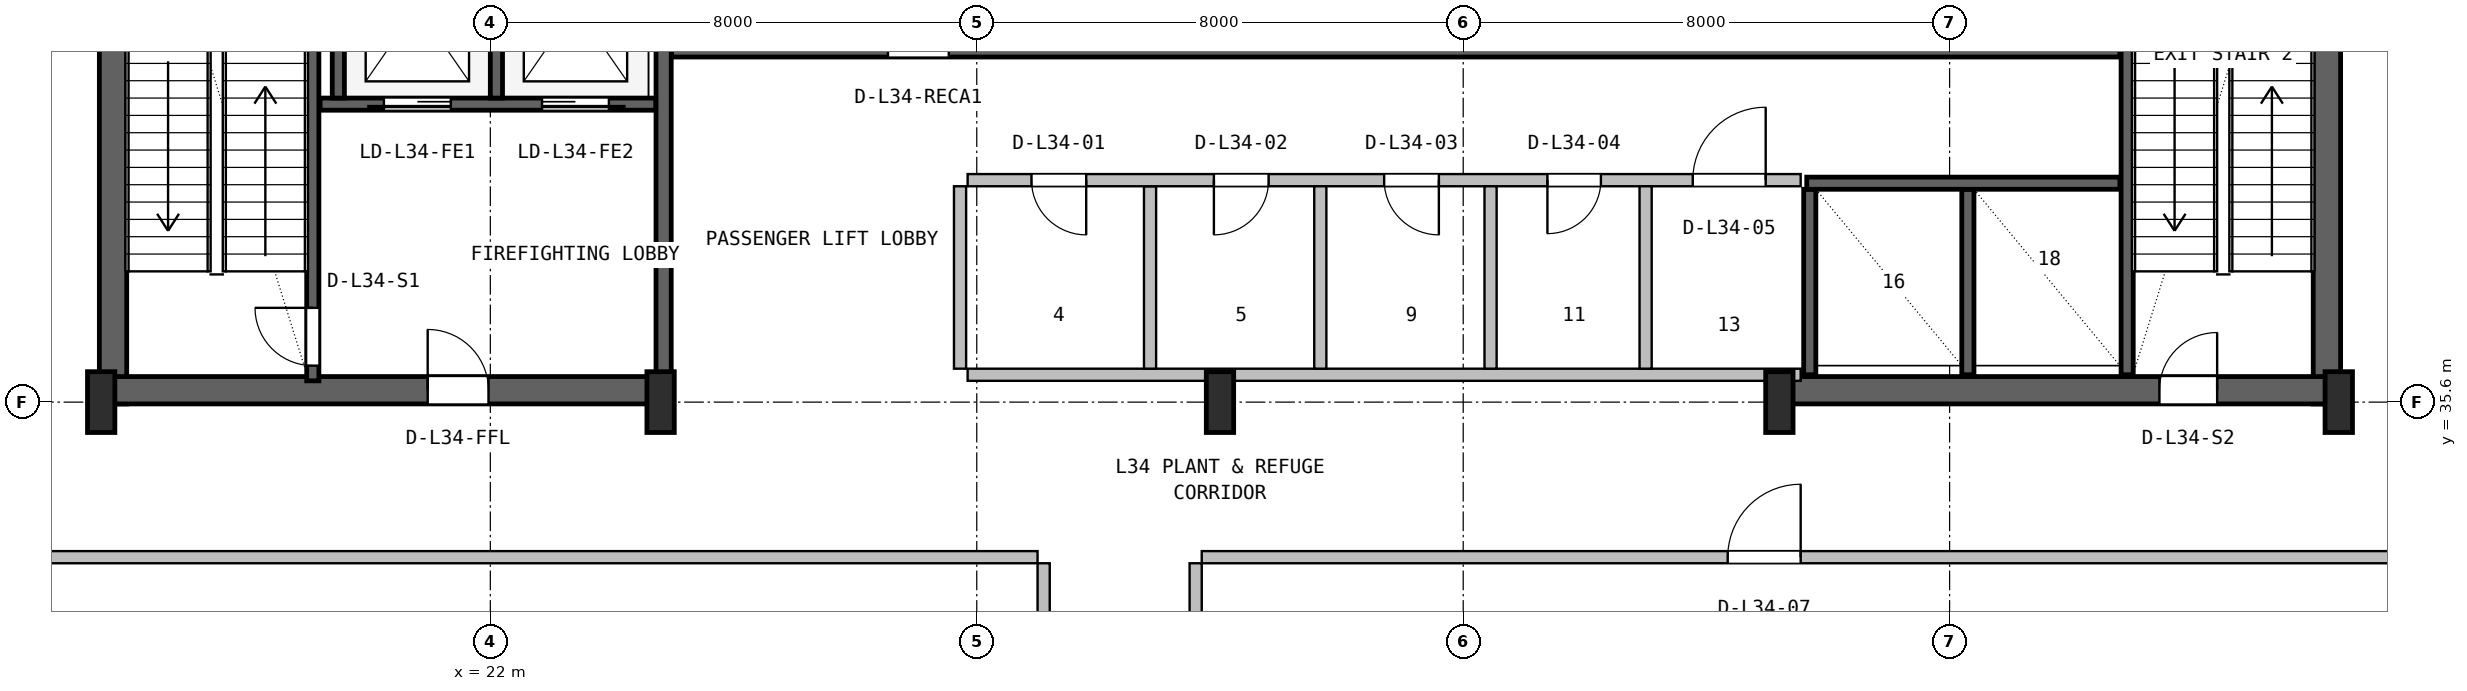
"""IFC4 building model, lengths in metres.
Left out: names, types, materials, properties, quantities, classifications, styles, units other than length and angle.
Written with IfcOpenShell. Run it as: python <this file> out.ifc"""

import sys

from ifc_helpers import new_model, si_unit, direction, frame, frame_2d, origin, origin_2d, place, context, subcontext, project, spatial, rectangle, i_section, extrude, source, transform, mapped, element, fill, save


model = new_model("IFC4")
c1 = context("Model", 3, precision=1e-05, world=origin(), true_north=direction((0.0, 1.0)))
c2 = subcontext(c1, "Body", "Model", "MODEL_VIEW")
j1 = project(units=[si_unit("LENGTHUNIT", "METRE"), si_unit("PLANEANGLEUNIT", "RADIAN")], contexts=[c1])
p1 = place(None, origin())
s1 = spatial("IfcSite", under=j1, at=p1, CompositionType="ELEMENT")
p2 = place(p1, origin())
s2 = spatial("IfcBuilding", under=s1, at=p2, CompositionType="ELEMENT")
p3 = place(p2, frame((0.0, 0.0, 141.0)))
s3 = spatial("IfcBuildingStorey", under=s2, at=p3, CompositionType="ELEMENT", Elevation=141.0)
for number, where, z_axis, x_axis in (
    (1, (15.795, 35.57, 0.0), (0.0, 0.0, 1.0), (0.0, 1.0, 0.0)),
    (2, (52.205, 35.57, 0.0), (0.0, 0.0, 1.0), (0.0, 1.0, 0.0)),
):
    element("IfcWall", number, at=place(p3, frame(where, z_axis=z_axis, x_axis=x_axis)), inside=s3, PredefinedType="SHEAR", context=c2, shape_type="SweptSolid", body=[
        extrude(rectangle(XDim=11.23, YDim=0.45, at=frame_2d((5.615, 0.0))), origin(), (0.0, 0.0, 1.0), 4.55),
    ])
p4 = place(p3, frame((15.57, 35.795, 0.0), z_axis=(0.0, 0.0, 1.0), x_axis=(1.0, 0.0, 0.0)))
e3 = element("IfcWall", 3, at=p4, inside=s3, PredefinedType="SHEAR", context=c2, shape_type="SweptSolid", body=[
    extrude(rectangle(XDim=9.23, YDim=0.45, at=frame_2d((4.615, 0.0))), origin(), (0.0, 0.0, 1.0), 4.55),
])
p5 = place(p4, frame((5.4, 0.0, 0.0)))
e4 = element("IfcOpeningElement", 4, at=p5, cuts=e3, PredefinedType="OPENING", context=c2, shape_type="SweptSolid", body=[
    extrude(rectangle(XDim=1.0, YDim=2.1, at=frame_2d((0.5, 1.05))), frame((0.0, 0.235, 0.0), z_axis=(0.0, -1.0, 0.0), x_axis=(1.0, 0.0, 0.0)), (0.0, 0.0, 1.0), 0.47),
])
p6 = place(p3, frame((43.2, 35.795, 0.0), z_axis=(0.0, 0.0, 1.0), x_axis=(1.0, 0.0, 0.0)))
e5 = element("IfcWall", 5, at=p6, inside=s3, PredefinedType="SHEAR", context=c2, shape_type="SweptSolid", body=[
    extrude(rectangle(XDim=9.23, YDim=0.45, at=frame_2d((4.615, 0.0))), origin(), (0.0, 0.0, 1.0), 4.55),
])
p7 = place(p6, frame((6.25, 0.0, 0.0)))
e6 = element("IfcOpeningElement", 6, at=p7, cuts=e5, PredefinedType="OPENING", context=c2, shape_type="SweptSolid", body=[
    extrude(rectangle(XDim=0.95, YDim=2.1, at=frame_2d((0.475, 1.05))), frame((0.0, 0.235, 0.0), z_axis=(0.0, -1.0, 0.0), x_axis=(1.0, 0.0, 0.0)), (0.0, 0.0, 1.0), 0.47),
])
m1 = source(origin(), c2, "Body", "SweptSolid", [
    extrude(i_section(OverallWidth=0.45, OverallDepth=1.0, WebThickness=0.016, FlangeThickness=0.03, FilletRadius=0.016, at=origin_2d()), origin(), (0.0, 0.0, 1.0), 4.8),
])
for number, where, z_axis, x_axis in (
    (7, (15.6, 35.6, 0.0), (0.0, 0.0, 1.0), (1.0, 0.0, 0.0)),
    (8, (24.8, 35.6, 0.0), (0.0, 0.0, 1.0), (1.0, 0.0, 0.0)),
    (9, (34.0, 35.6, 0.0), (0.0, 0.0, 1.0), (1.0, 0.0, 0.0)),
    (10, (43.2, 35.6, 0.0), (0.0, 0.0, 1.0), (1.0, 0.0, 0.0)),
    (11, (52.4, 35.6, 0.0), (0.0, 0.0, 1.0), (1.0, 0.0, 0.0)),
):
    element("IfcColumn", number, at=place(p3, frame(where, z_axis=z_axis, x_axis=x_axis)), inside=s3, PredefinedType="COLUMN", context=c2, shape_type="MappedRepresentation", body=[
        mapped(m1, transform((0.0, 0.0, 0.0), x_axis=(1.0, 0.0, 0.0), y_axis=(0.0, 1.0, 0.0), z_axis=(0.0, 0.0, 1.0), scale=1.0)),
    ])
p8 = place(p3, frame((19.08, 35.95, 0.0), z_axis=(0.0, 0.0, 1.0), x_axis=(0.0, 1.0, 0.0)))
e12 = element("IfcWall", 12, at=p8, inside=s3, PredefinedType="SHEAR", context=c2, shape_type="SweptSolid", body=[
    extrude(rectangle(XDim=9.65, YDim=0.2, at=frame_2d((4.825, 0.0))), origin(), (0.0, 0.0, 1.0), 4.55),
])
p9 = place(p8, frame((0.25, 0.0, 0.0)))
e13 = element("IfcOpeningElement", 13, at=p9, cuts=e12, PredefinedType="OPENING", context=c2, shape_type="SweptSolid", body=[
    extrude(rectangle(XDim=0.95, YDim=2.1, at=frame_2d((0.475, 1.05))), frame((0.0, 0.11, 0.0), z_axis=(0.0, -1.0, 0.0), x_axis=(1.0, 0.0, 0.0)), (0.0, 0.0, 1.0), 0.22),
])
p10 = place(p3, frame((24.85, 36.05, 0.0), z_axis=(0.0, 0.0, 1.0), x_axis=(0.0, 1.0, 0.0)))
e14 = element("IfcWall", 14, at=p10, inside=s3, PredefinedType="SHEAR", context=c2, shape_type="SweptSolid", body=[
    extrude(rectangle(XDim=10.45, YDim=0.25, at=frame_2d((5.225, 0.0))), origin(), (0.0, 0.0, 1.0), 4.55),
])
p11 = place(p3, frame((19.2, 40.5, 0.0), z_axis=(0.0, 0.0, 1.0), x_axis=(1.0, 0.0, 0.0)))
e15 = element("IfcWall", 15, at=p11, inside=s3, PredefinedType="SHEAR", context=c2, shape_type="SweptSolid", body=[
    extrude(rectangle(XDim=5.52, YDim=0.2, at=frame_2d((2.76, 0.0))), origin(), (0.0, 0.0, 1.0), 4.55),
])
p12 = place(p11, frame((1.05, 0.0, 0.0)))
e16 = element("IfcOpeningElement", 16, at=p12, cuts=e15, PredefinedType="OPENING", context=c2, shape_type="SweptSolid", body=[
    extrude(rectangle(XDim=1.1, YDim=2.18, at=frame_2d((0.55, 1.09))), frame((0.0, 0.11, 0.0), z_axis=(0.0, -1.0, 0.0), x_axis=(1.0, 0.0, 0.0)), (0.0, 0.0, 1.0), 0.22),
])
p13 = place(p11, frame((3.65, 0.0, 0.0)))
e17 = element("IfcOpeningElement", 17, at=p13, cuts=e15, PredefinedType="OPENING", context=c2, shape_type="SweptSolid", body=[
    extrude(rectangle(XDim=1.1, YDim=2.18, at=frame_2d((0.55, 1.09))), frame((0.0, 0.11, 0.0), z_axis=(0.0, -1.0, 0.0), x_axis=(1.0, 0.0, 0.0)), (0.0, 0.0, 1.0), 0.22),
])
p14 = place(p3, frame((22.1, 40.6, 0.0), z_axis=(0.0, 0.0, 1.0), x_axis=(0.0, 1.0, 0.0)))
e18 = element("IfcWall", 18, at=p14, inside=s3, PredefinedType="SHEAR", context=c2, shape_type="SweptSolid", body=[
    extrude(rectangle(XDim=3.0, YDim=0.2, at=frame_2d((1.5, 0.0))), origin(), (0.0, 0.0, 1.0), 4.55),
])
p15 = place(p3, frame((19.5, 40.6, 0.0), z_axis=(0.0, 0.0, 1.0), x_axis=(0.0, 1.0, 0.0)))
e19 = element("IfcWall", 19, at=p15, inside=s3, PredefinedType="SHEAR", context=c2, shape_type="SweptSolid", body=[
    extrude(rectangle(XDim=5.95, YDim=0.2, at=frame_2d((2.975, 0.0))), origin(), (0.0, 0.0, 1.0), 4.55),
])
p16 = place(p3, frame((48.92, 36.05, 0.0), z_axis=(0.0, 0.0, 1.0), x_axis=(0.0, 1.0, 0.0)))
e20 = element("IfcWall", 20, at=p16, inside=s3, PredefinedType="SHEAR", context=c2, shape_type="SweptSolid", body=[
    extrude(rectangle(XDim=10.5, YDim=0.2, at=frame_2d((5.25, 0.0))), origin(), (0.0, 0.0, 1.0), 4.55),
])
p17 = place(p3, frame((24.98, 41.4, 0.0), z_axis=(0.0, 0.0, 1.0), x_axis=(1.0, 0.0, 0.0)))
e21 = element("IfcWall", 21, at=p17, inside=s3, PredefinedType="SHEAR", context=c2, shape_type="SweptSolid", body=[
    extrude(rectangle(XDim=23.82, YDim=0.25, at=frame_2d((11.91, 0.0))), origin(), (0.0, 0.0, 1.0), 4.55),
])
p18 = place(p17, frame((3.56, 0.0, 0.0)))
e22 = element("IfcOpeningElement", 22, at=p18, cuts=e21, PredefinedType="OPENING", context=c2, shape_type="SweptSolid", body=[
    extrude(rectangle(XDim=1.0, YDim=2.08, at=frame_2d((0.5, 1.04))), frame((0.0, 0.135, 0.0), z_axis=(0.0, -1.0, 0.0), x_axis=(1.0, 0.0, 0.0)), (0.0, 0.0, 1.0), 0.27),
])
for number, where, z_axis, x_axis in (
    (23, (43.7, 36.05, 0.0), (0.0, 0.0, 1.0), (0.0, 1.0, 0.0)),
    (24, (46.3, 36.05, 0.0), (0.0, 0.0, 1.0), (0.0, 1.0, 0.0)),
):
    element("IfcWall", number, at=place(p3, frame(where, z_axis=z_axis, x_axis=x_axis)), inside=s3, PredefinedType="SHEAR", context=c2, shape_type="SweptSolid", body=[
        extrude(rectangle(XDim=3.05, YDim=0.2, at=frame_2d((1.525, 0.0))), origin(), (0.0, 0.0, 1.0), 4.55),
    ])
p19 = place(p3, frame((43.65, 39.2, 0.0), z_axis=(0.0, 0.0, 1.0), x_axis=(1.0, 0.0, 0.0)))
e25 = element("IfcWall", 25, at=p19, inside=s3, PredefinedType="SHEAR", context=c2, shape_type="SweptSolid", body=[
    extrude(rectangle(XDim=5.15, YDim=0.2, at=frame_2d((2.575, 0.0))), origin(), (0.0, 0.0, 1.0), 4.55),
])
p20 = place(p3, frame((29.85, 36.05, 0.0), z_axis=(0.0, 0.0, 1.0), x_axis=(1.0, 0.0, 0.0)))
e26 = element("IfcWall", 26, at=p20, inside=s3, PredefinedType="SOLIDWALL", context=c2, shape_type="SweptSolid", body=[
    extrude(rectangle(XDim=13.7, YDim=0.2, at=frame_2d((6.85, 0.0))), origin(), (0.0, 0.0, 1.0), 4.53),
])
p21 = place(p3, frame((32.85, 36.15, 0.0), z_axis=(0.0, 0.0, 1.0), x_axis=(0.0, 1.0, 0.0)))
e27 = element("IfcWall", 27, at=p21, inside=s3, PredefinedType="SOLIDWALL", context=c2, shape_type="SweptSolid", body=[
    extrude(rectangle(XDim=3.0, YDim=0.2, at=frame_2d((1.5, 0.0))), origin(), (0.0, 0.0, 1.0), 4.53),
])
p22 = place(p3, frame((29.85, 39.25, 0.0), z_axis=(0.0, 0.0, 1.0), x_axis=(1.0, 0.0, 0.0)))
e28 = element("IfcWall", 28, at=p22, inside=s3, PredefinedType="SOLIDWALL", context=c2, shape_type="SweptSolid", body=[
    extrude(rectangle(XDim=13.7, YDim=0.2, at=frame_2d((6.85, 0.0))), origin(), (0.0, 0.0, 1.0), 4.53),
])
p23 = place(p22, frame((1.05, 0.0, 0.0)))
e29 = element("IfcOpeningElement", 29, at=p23, cuts=e28, PredefinedType="OPENING", context=c2, shape_type="SweptSolid", body=[
    extrude(rectangle(XDim=0.9, YDim=2.06, at=frame_2d((0.45, 1.03))), frame((0.0, 0.11, 0.0), z_axis=(0.0, -1.0, 0.0), x_axis=(1.0, 0.0, 0.0)), (0.0, 0.0, 1.0), 0.22),
])
p24 = place(p22, frame((4.05, 0.0, 0.0)))
e30 = element("IfcOpeningElement", 30, at=p24, cuts=e28, PredefinedType="OPENING", context=c2, shape_type="SweptSolid", body=[
    extrude(rectangle(XDim=0.9, YDim=2.06, at=frame_2d((0.45, 1.03))), frame((0.0, 0.11, 0.0), z_axis=(0.0, -1.0, 0.0), x_axis=(1.0, 0.0, 0.0)), (0.0, 0.0, 1.0), 0.22),
])
p25 = place(p22, frame((6.85, 0.0, 0.0)))
e31 = element("IfcOpeningElement", 31, at=p25, cuts=e28, PredefinedType="OPENING", context=c2, shape_type="SweptSolid", body=[
    extrude(rectangle(XDim=0.9, YDim=2.06, at=frame_2d((0.45, 1.03))), frame((0.0, 0.11, 0.0), z_axis=(0.0, -1.0, 0.0), x_axis=(1.0, 0.0, 0.0)), (0.0, 0.0, 1.0), 0.22),
])
p26 = place(p22, frame((9.535, 0.0, 0.0)))
e32 = element("IfcOpeningElement", 32, at=p26, cuts=e28, PredefinedType="OPENING", context=c2, shape_type="SweptSolid", body=[
    extrude(rectangle(XDim=0.88, YDim=2.06, at=frame_2d((0.44, 1.03))), frame((0.0, 0.11, 0.0), z_axis=(0.0, -1.0, 0.0), x_axis=(1.0, 0.0, 0.0)), (0.0, 0.0, 1.0), 0.22),
])
p27 = place(p22, frame((11.925, 0.0, 0.0)))
e33 = element("IfcOpeningElement", 33, at=p27, cuts=e28, PredefinedType="OPENING", context=c2, shape_type="SweptSolid", body=[
    extrude(rectangle(XDim=1.2, YDim=2.1, at=frame_2d((0.6, 1.05))), frame((0.0, 0.11, 0.0), z_axis=(0.0, -1.0, 0.0), x_axis=(1.0, 0.0, 0.0)), (0.0, 0.0, 1.0), 0.22),
])
for number, where, z_axis, x_axis in (
    (34, (29.725, 36.15, 0.0), (0.0, 0.0, 1.0), (0.0, 1.0, 0.0)),
    (35, (35.65, 36.15, 0.0), (0.0, 0.0, 1.0), (0.0, 1.0, 0.0)),
    (36, (38.45, 36.15, 0.0), (0.0, 0.0, 1.0), (0.0, 1.0, 0.0)),
    (37, (41.0, 36.15, 0.0), (0.0, 0.0, 1.0), (0.0, 1.0, 0.0)),
):
    element("IfcWall", number, at=place(p3, frame(where, z_axis=z_axis, x_axis=x_axis)), inside=s3, PredefinedType="SOLIDWALL", context=c2, shape_type="SweptSolid", body=[
        extrude(rectangle(XDim=3.0, YDim=0.2, at=frame_2d((1.5, 0.0))), origin(), (0.0, 0.0, 1.0), 4.53),
    ])
p28 = place(p3, frame((31.1, 19.775, 0.0), z_axis=(0.0, 0.0, 1.0), x_axis=(0.0, 1.0, 0.0)))
e38 = element("IfcWall", 38, at=p28, inside=s3, PredefinedType="SOLIDWALL", context=c2, shape_type="SweptSolid", body=[
    extrude(rectangle(XDim=13.175, YDim=0.2, at=frame_2d((6.587, 0.0))), origin(), (0.0, 0.0, 1.0), 2.925),
])
p29 = place(p3, frame((4.68, 33.05, 0.0), z_axis=(0.0, 0.0, 1.0), x_axis=(1.0, 0.0, 0.0)))
e39 = element("IfcWall", 39, at=p29, inside=s3, PredefinedType="SOLIDWALL", context=c2, shape_type="SweptSolid", body=[
    extrude(rectangle(XDim=26.32, YDim=0.2, at=frame_2d((13.16, 0.0))), origin(), (0.0, 0.0, 1.0), 2.925),
])
p30 = place(p3, frame((33.7, 33.05, 0.0), z_axis=(0.0, 0.0, 1.0), x_axis=(1.0, 0.0, 0.0)))
e40 = element("IfcWall", 40, at=p30, inside=s3, PredefinedType="SOLIDWALL", context=c2, shape_type="SweptSolid", body=[
    extrude(rectangle(XDim=29.62, YDim=0.2, at=frame_2d((14.81, 0.0))), origin(), (0.0, 0.0, 1.0), 2.925),
])
p31 = place(p30, frame((8.65, 0.0, 0.0)))
e41 = element("IfcOpeningElement", 41, at=p31, cuts=e40, PredefinedType="OPENING", context=c2, shape_type="SweptSolid", body=[
    extrude(rectangle(XDim=1.2, YDim=2.1, at=frame_2d((0.6, 1.05))), frame((0.0, 0.11, 0.0), z_axis=(0.0, -1.0, 0.0), x_axis=(1.0, 0.0, 0.0)), (0.0, 0.0, 1.0), 0.22),
])
p32 = place(p3, frame((33.6, 4.38, 0.0), z_axis=(0.0, 0.0, 1.0), x_axis=(0.0, 1.0, 0.0)))
e42 = element("IfcWall", 42, at=p32, inside=s3, PredefinedType="SOLIDWALL", context=c2, shape_type="SweptSolid", body=[
    extrude(rectangle(XDim=28.57, YDim=0.2, at=frame_2d((14.285, 0.0))), origin(), (0.0, 0.0, 1.0), 2.925),
])
p33 = place(p32, frame((6.395, 0.0, 0.0)))
e43 = element("IfcOpeningElement", 43, at=p33, cuts=e42, PredefinedType="OPENING", context=c2, shape_type="SweptSolid", body=[
    extrude(rectangle(XDim=1.2, YDim=2.1, at=frame_2d((0.6, 1.05))), frame((0.0, 0.11, 0.0), z_axis=(0.0, -1.0, 0.0), x_axis=(1.0, 0.0, 0.0)), (0.0, 0.0, 1.0), 0.22),
])
m2 = source(origin(), c2, "Body", "SweptSolid", [
    extrude(rectangle(XDim=0.95, YDim=2.1, at=frame_2d((0.475, 1.05))), frame((0.0, 0.025, 0.0), z_axis=(0.0, -1.0, 0.0), x_axis=(1.0, 0.0, 0.0)), (0.0, 0.0, 1.0), 0.05),
])
p34 = place(p9, origin())
e44 = element("IfcDoor", 44, at=p34, inside=s3, OperationType="SINGLE_SWING_RIGHT", PredefinedType="DOOR", context=c2, shape_type="MappedRepresentation", body=[
    mapped(m2, transform((0.0, 0.0, 0.0), x_axis=(1.0, 0.0, 0.0), y_axis=(0.0, 1.0, 0.0), z_axis=(0.0, 0.0, 1.0), scale=1.0)),
])
fill(e13, e44)
m3 = source(origin(), c2, "Body", "SweptSolid", [
    extrude(rectangle(XDim=1.0, YDim=2.1, at=frame_2d((0.5, 1.05))), frame((0.0, 0.025, 0.0), z_axis=(0.0, -1.0, 0.0), x_axis=(1.0, 0.0, 0.0)), (0.0, 0.0, 1.0), 0.05),
])
p35 = place(p5, origin())
e45 = element("IfcDoor", 45, at=p35, inside=s3, OperationType="SINGLE_SWING_LEFT", PredefinedType="DOOR", context=c2, shape_type="MappedRepresentation", body=[
    mapped(m3, transform((0.0, 0.0, 0.0), x_axis=(1.0, 0.0, 0.0), y_axis=(0.0, 1.0, 0.0), z_axis=(0.0, 0.0, 1.0), scale=1.0)),
])
fill(e4, e45)
m4 = source(origin(), c2, "Body", "SweptSolid", [
    extrude(rectangle(XDim=1.1, YDim=2.18, at=frame_2d((0.55, 1.09))), frame((0.0, 0.025, 0.0), z_axis=(0.0, -1.0, 0.0), x_axis=(1.0, 0.0, 0.0)), (0.0, 0.0, 1.0), 0.05),
])
p36 = place(p12, frame((1.1, 0.0, 0.0), z_axis=(0.0, 0.0, 1.0), x_axis=(-1.0, 0.0, 0.0)))
e46 = element("IfcDoor", 46, at=p36, inside=s3, OperationType="SLIDING_TO_LEFT", PredefinedType="DOOR", context=c2, shape_type="MappedRepresentation", body=[
    mapped(m4, transform((0.0, 0.0, 0.0), x_axis=(1.0, 0.0, 0.0), y_axis=(0.0, 1.0, 0.0), z_axis=(0.0, 0.0, 1.0), scale=1.0)),
])
fill(e16, e46)
p37 = place(p13, frame((1.1, 0.0, 0.0), z_axis=(0.0, 0.0, 1.0), x_axis=(-1.0, 0.0, 0.0)))
e47 = element("IfcDoor", 47, at=p37, inside=s3, OperationType="SLIDING_TO_RIGHT", PredefinedType="DOOR", context=c2, shape_type="MappedRepresentation", body=[
    mapped(m4, transform((0.0, 0.0, 0.0), x_axis=(1.0, 0.0, 0.0), y_axis=(0.0, 1.0, 0.0), z_axis=(0.0, 0.0, 1.0), scale=1.0)),
])
fill(e17, e47)
p38 = place(p7, origin())
e48 = element("IfcDoor", 48, at=p38, inside=s3, OperationType="SINGLE_SWING_RIGHT", PredefinedType="DOOR", context=c2, shape_type="MappedRepresentation", body=[
    mapped(m2, transform((0.0, 0.0, 0.0), x_axis=(1.0, 0.0, 0.0), y_axis=(0.0, 1.0, 0.0), z_axis=(0.0, 0.0, 1.0), scale=1.0)),
])
fill(e6, e48)
m5 = source(origin(), c2, "Body", "SweptSolid", [
    extrude(rectangle(XDim=0.9, YDim=2.06, at=frame_2d((0.45, 1.03))), frame((0.0, 0.025, 0.0), z_axis=(0.0, -1.0, 0.0), x_axis=(1.0, 0.0, 0.0)), (0.0, 0.0, 1.0), 0.05),
])
p39 = place(p23, frame((0.9, 0.0, 0.0), z_axis=(0.0, 0.0, 1.0), x_axis=(-1.0, 0.0, 0.0)))
e49 = element("IfcDoor", 49, at=p39, inside=s3, OperationType="SINGLE_SWING_RIGHT", PredefinedType="DOOR", context=c2, shape_type="MappedRepresentation", body=[
    mapped(m5, transform((0.0, 0.0, 0.0), x_axis=(1.0, 0.0, 0.0), y_axis=(0.0, 1.0, 0.0), z_axis=(0.0, 0.0, 1.0), scale=1.0)),
])
fill(e29, e49)
p40 = place(p24, frame((0.9, 0.0, 0.0), z_axis=(0.0, 0.0, 1.0), x_axis=(-1.0, 0.0, 0.0)))
e50 = element("IfcDoor", 50, at=p40, inside=s3, OperationType="SINGLE_SWING_LEFT", PredefinedType="DOOR", context=c2, shape_type="MappedRepresentation", body=[
    mapped(m5, transform((0.0, 0.0, 0.0), x_axis=(1.0, 0.0, 0.0), y_axis=(0.0, 1.0, 0.0), z_axis=(0.0, 0.0, 1.0), scale=1.0)),
])
fill(e30, e50)
p41 = place(p25, frame((0.9, 0.0, 0.0), z_axis=(0.0, 0.0, 1.0), x_axis=(-1.0, 0.0, 0.0)))
e51 = element("IfcDoor", 51, at=p41, inside=s3, OperationType="SINGLE_SWING_RIGHT", PredefinedType="DOOR", context=c2, shape_type="MappedRepresentation", body=[
    mapped(m5, transform((0.0, 0.0, 0.0), x_axis=(1.0, 0.0, 0.0), y_axis=(0.0, 1.0, 0.0), z_axis=(0.0, 0.0, 1.0), scale=1.0)),
])
fill(e31, e51)
m6 = source(origin(), c2, "Body", "SweptSolid", [
    extrude(rectangle(XDim=0.88, YDim=2.06, at=frame_2d((0.44, 1.03))), frame((0.0, 0.025, 0.0), z_axis=(0.0, -1.0, 0.0), x_axis=(1.0, 0.0, 0.0)), (0.0, 0.0, 1.0), 0.05),
])
p42 = place(p26, frame((0.88, 0.0, 0.0), z_axis=(0.0, 0.0, 1.0), x_axis=(-1.0, 0.0, 0.0)))
e52 = element("IfcDoor", 52, at=p42, inside=s3, OperationType="SINGLE_SWING_LEFT", PredefinedType="DOOR", context=c2, shape_type="MappedRepresentation", body=[
    mapped(m6, transform((0.0, 0.0, 0.0), x_axis=(1.0, 0.0, 0.0), y_axis=(0.0, 1.0, 0.0), z_axis=(0.0, 0.0, 1.0), scale=1.0)),
])
fill(e32, e52)
m7 = source(origin(), c2, "Body", "SweptSolid", [
    extrude(rectangle(XDim=1.2, YDim=2.1, at=frame_2d((0.6, 1.05))), frame((0.0, 0.025, 0.0), z_axis=(0.0, -1.0, 0.0), x_axis=(1.0, 0.0, 0.0)), (0.0, 0.0, 1.0), 0.05),
])
p43 = place(p27, origin())
e53 = element("IfcDoor", 53, at=p43, inside=s3, OperationType="SINGLE_SWING_RIGHT", PredefinedType="DOOR", context=c2, shape_type="MappedRepresentation", body=[
    mapped(m7, transform((0.0, 0.0, 0.0), x_axis=(1.0, 0.0, 0.0), y_axis=(0.0, 1.0, 0.0), z_axis=(0.0, 0.0, 1.0), scale=1.0)),
])
fill(e33, e53)
p44 = place(p31, origin())
e54 = element("IfcDoor", 54, at=p44, inside=s3, OperationType="SINGLE_SWING_RIGHT", PredefinedType="DOOR", context=c2, shape_type="MappedRepresentation", body=[
    mapped(m7, transform((0.0, 0.0, 0.0), x_axis=(1.0, 0.0, 0.0), y_axis=(0.0, 1.0, 0.0), z_axis=(0.0, 0.0, 1.0), scale=1.0)),
])
fill(e41, e54)
save(model, sys.argv[1])
